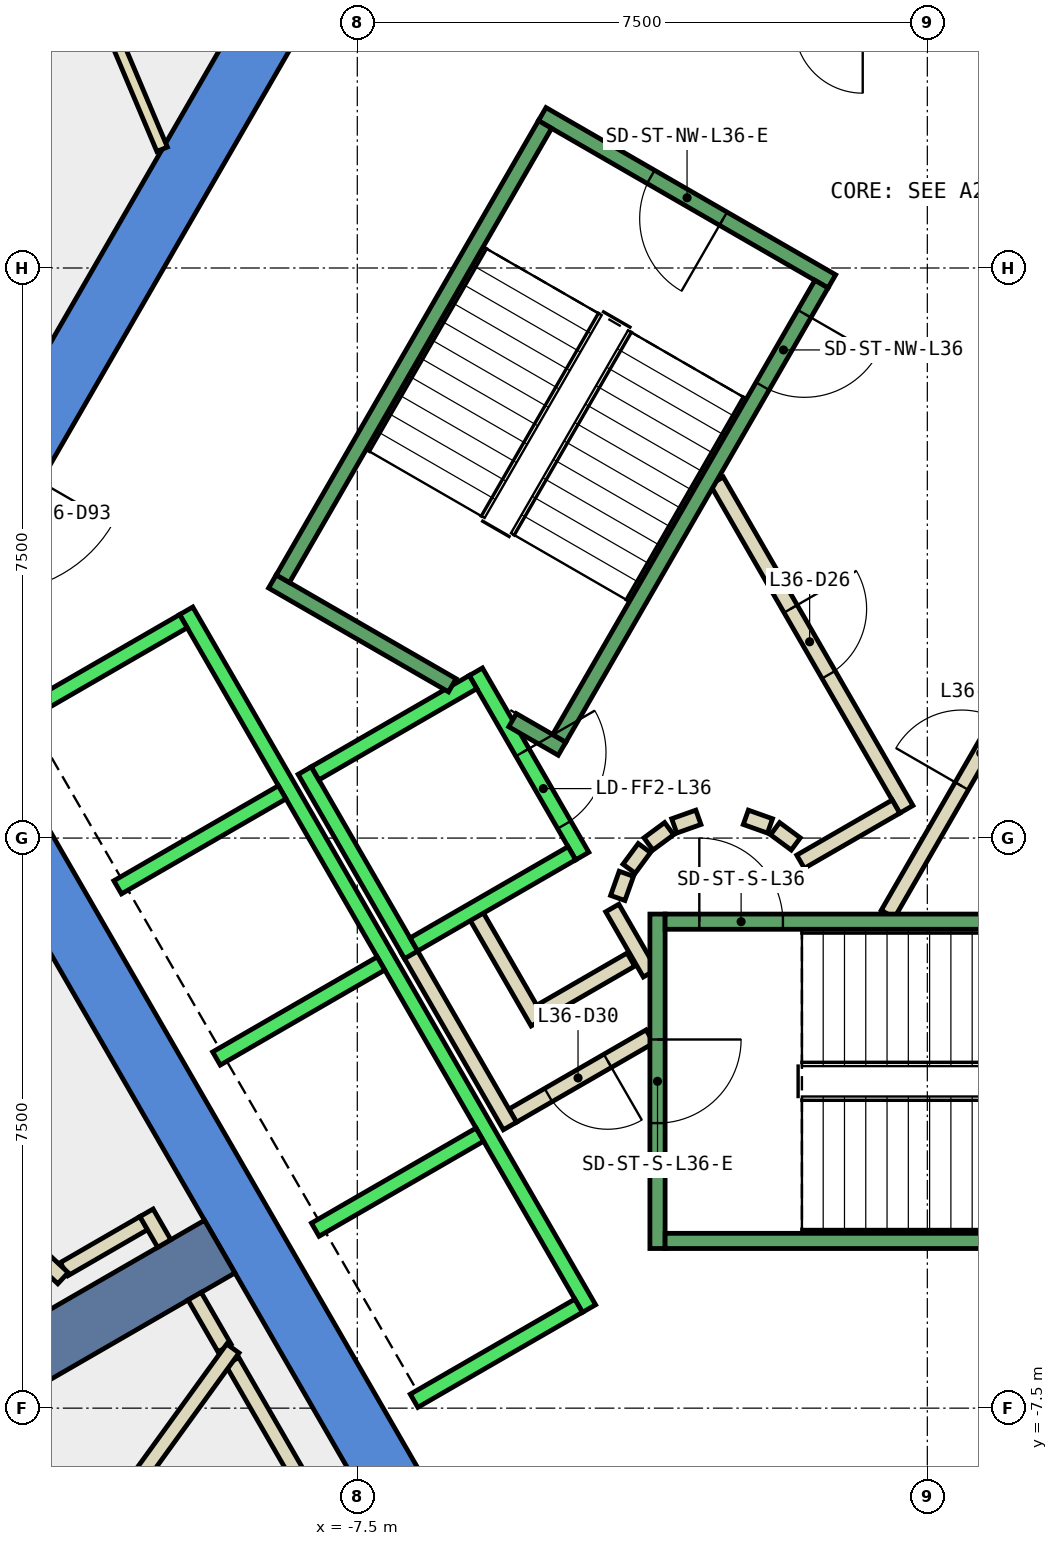
"""IFC4 building model, lengths in metres.
Left out: names, types, materials, properties, quantities, classifications, styles, units other than length and angle.
Written with IfcOpenShell. Run it as: python <this file> out.ifc"""

import sys

from ifc_helpers import new_model, si_unit, direction, frame, frame_2d, origin, place, context, subcontext, project, spatial, polyline, rectangle, outline, extrude, element, fill, save


model = new_model("IFC4")
c1 = context("Model", 3, precision=1e-05, world=origin(), true_north=direction((0.0, 1.0)))
c2 = subcontext(c1, "Body", "Model", "MODEL_VIEW")
j1 = project(units=[si_unit("LENGTHUNIT", "METRE"), si_unit("PLANEANGLEUNIT", "RADIAN")], contexts=[c1])
p1 = place(None, origin())
s1 = spatial("IfcSite", under=j1, at=p1, CompositionType="ELEMENT")
p2 = place(p1, origin())
s2 = spatial("IfcBuilding", under=s1, at=p2, CompositionType="ELEMENT")
p3 = place(p2, frame((0.0, 0.0, 163.4)))
s3 = spatial("IfcBuildingStorey", under=s2, at=p3, CompositionType="ELEMENT", Elevation=163.4)
p4 = place(p3, frame((0.0, 0.0, -0.4)))
e1 = element("IfcWall", 1, at=p4, inside=s3, PredefinedType="SHEAR", context=c2, shape_type="SweptSolid", body=[
    extrude(outline(polyline([(-12.267, 5.252), (-11.575, 4.852), (-6.466, 13.7), (-6.928, 14.5), (-12.267, 5.252)])), origin(), (0.0, 0.0, 1.0), 4.2),
])
p5 = place(p3, frame((0.0, 0.0, -0.4)))
e2 = element("IfcWall", 2, at=p5, inside=s3, PredefinedType="SHEAR", context=c2, shape_type="SweptSolid", body=[
    extrude(outline(polyline([(-13.856, 2.5), (-6.928, -9.5), (-6.466, -8.7), (-12.933, 2.5), (-13.856, 2.5)])), origin(), (0.0, 0.0, 1.0), 4.2),
])
p6 = place(p3, frame((-9.31, -5.375, -0.4), z_axis=(0.0, 0.0, 1.0), x_axis=(-0.866017533419, -0.500013631625, 0.0)))
e3 = element("IfcWall", 3, at=p6, inside=s3, PredefinedType="SHEAR", context=c2, shape_type="SweptSolid", body=[
    extrude(rectangle(XDim=9.0, YDim=0.8, at=frame_2d((4.5, 0.0))), origin(), (0.0, 0.0, 1.0), 4.2),
])
p7 = place(p3, frame((-3.9, -1.599, 0.0), z_axis=(0.0, 0.0, 1.0), x_axis=(-0.865969445389, -0.500096910261, 0.0)))
e4 = element("IfcWall", 4, at=p7, inside=s3, PredefinedType="PARTITIONING", context=c2, shape_type="SweptSolid", body=[
    extrude(rectangle(XDim=1.373, YDim=0.2, at=frame_2d((0.687, 0.0))), origin(), (0.0, 0.0, 1.0), 3.8),
])
p8 = place(p3, frame((-5.126, -2.422, 0.0), z_axis=(0.0, 0.0, 1.0), x_axis=(-0.500062241894, 0.865989465428, 0.0)))
e5 = element("IfcWall", 5, at=p8, inside=s3, PredefinedType="PARTITIONING", context=c2, shape_type="SweptSolid", body=[
    extrude(rectangle(XDim=1.7, YDim=0.2, at=frame_2d((0.85, 0.0))), origin(), (0.0, 0.0, 1.0), 3.8),
])
p9 = place(p3, frame((-3.65, -2.61, 0.0), z_axis=(0.0, 0.0, 1.0), x_axis=(-0.866072462134, -0.499918483688, 0.0)))
e6 = element("IfcWall", 6, at=p9, inside=s3, PredefinedType="PARTITIONING", context=c2, shape_type="SweptSolid", body=[
    extrude(rectangle(XDim=2.084, YDim=0.2, at=frame_2d((1.042, 0.0))), origin(), (0.0, 0.0, 1.0), 3.8),
])
p10 = place(p9, frame((0.642, 0.0, 0.0)))
e7 = element("IfcOpeningElement", 7, at=p10, cuts=e6, PredefinedType="OPENING", context=c2, shape_type="SweptSolid", body=[
    extrude(rectangle(XDim=0.9, YDim=2.1, at=frame_2d((0.45, 1.05))), frame((0.0, 0.11, 0.0), z_axis=(0.0, -1.0, 0.0), x_axis=(1.0, 0.0, 0.0)), (0.0, 0.0, 1.0), 0.22),
])
p11 = place(p3, frame((-5.492, -3.788, 0.0), z_axis=(0.0, 0.0, 1.0), x_axis=(-0.500008949224, 0.866020236886, 0.0)))
e8 = element("IfcWall", 8, at=p11, inside=s3, PredefinedType="PARTITIONING", context=c2, shape_type="SweptSolid", body=[
    extrude(rectangle(XDim=2.68, YDim=0.2, at=frame_2d((1.34, 0.0))), origin(), (0.0, 0.0, 1.0), 3.8),
])
p12 = place(p3, frame((-4.145, -0.92, 0.0), z_axis=(0.0, 0.0, 1.0), x_axis=(0.499743786207, -0.866173278362, 0.0)))
e9 = element("IfcWall", 9, at=p12, inside=s3, PredefinedType="PARTITIONING", context=c2, shape_type="SweptSolid", body=[
    extrude(rectangle(XDim=0.991, YDim=0.2, at=frame_2d((0.495, 0.0))), origin(), (0.0, 0.0, 1.0), 3.8),
])
p13 = place(p3, frame((-10.068, 9.062, 0.0), z_axis=(0.0, 0.0, 1.0), x_axis=(-0.388992587102, 0.921240884448, 0.0)))
e10 = element("IfcWall", 10, at=p13, inside=s3, PredefinedType="PARTITIONING", context=c2, shape_type="SweptSolid", body=[
    extrude(rectangle(XDim=4.257, YDim=0.15, at=frame_2d((2.128, 0.0))), origin(), (0.0, 0.0, 1.0), 3.8),
])
p14 = place(p3, frame((-0.52, -1.0, 0.0), z_axis=(0.0, 0.0, 1.0), x_axis=(0.50011622646, 0.865958290007, 0.0)))
e11 = element("IfcWall", 11, at=p14, inside=s3, PredefinedType="PARTITIONING", context=c2, shape_type="SweptSolid", body=[
    extrude(rectangle(XDim=4.991, YDim=0.2, at=frame_2d((2.496, 0.0))), origin(), (0.0, 0.0, 1.0), 3.8),
])
p15 = place(p14, frame((1.945, 0.0, 0.0)))
e12 = element("IfcOpeningElement", 12, at=p15, cuts=e11, PredefinedType="OPENING", context=c2, shape_type="SweptSolid", body=[
    extrude(rectangle(XDim=1.0, YDim=2.1, at=frame_2d((0.5, 1.05))), frame((0.0, 0.11, 0.0), z_axis=(0.0, -1.0, 0.0), x_axis=(1.0, 0.0, 0.0)), (0.0, 0.0, 1.0), 0.22),
])
p16 = place(p3, frame((-2.771, 4.7, 0.0), z_axis=(0.0, 0.0, 1.0), x_axis=(0.499969479948, -0.866043023828, 0.0)))
e13 = element("IfcWall", 13, at=p16, inside=s3, PredefinedType="PARTITIONING", context=c2, shape_type="SweptSolid", body=[
    extrude(rectangle(XDim=4.99, YDim=0.2, at=frame_2d((2.495, 0.0))), origin(), (0.0, 0.0, 1.0), 3.8),
])
p17 = place(p16, frame((1.945, 0.0, 0.0)))
e14 = element("IfcOpeningElement", 14, at=p17, cuts=e13, PredefinedType="OPENING", context=c2, shape_type="SweptSolid", body=[
    extrude(rectangle(XDim=1.0, YDim=2.1, at=frame_2d((0.5, 1.05))), frame((0.0, 0.11, 0.0), z_axis=(0.0, -1.0, 0.0), x_axis=(1.0, 0.0, 0.0)), (0.0, 0.0, 1.0), 0.22),
])
p18 = place(p3, frame((-0.412, 0.414, 0.0), z_axis=(0.0, 0.0, 1.0), x_axis=(-0.866017369001, -0.500013916395, 0.0)))
e15 = element("IfcWall", 15, at=p18, inside=s3, PredefinedType="PARTITIONING", context=c2, shape_type="SweptSolid", body=[
    extrude(rectangle(XDim=1.45, YDim=0.2, at=frame_2d((0.725, 0.0))), origin(), (0.0, 0.0, 1.0), 3.8),
])
p19 = place(p3, frame((-1.731, -0.077, 0.0), z_axis=(0.0, 0.0, 1.0), x_axis=(-0.804311165252, 0.594208338422, 0.0)))
e16 = element("IfcWall", 16, at=p19, inside=s3, PredefinedType="PARTITIONING", context=c2, shape_type="SweptSolid", body=[
    extrude(rectangle(XDim=0.338, YDim=0.2, at=frame_2d((0.169, 0.0))), origin(), (0.0, 0.0, 1.0), 3.8),
])
p20 = place(p3, frame((-2.07, 0.16, 0.0), z_axis=(0.0, 0.0, 1.0), x_axis=(-0.942199461132, 0.335052496547, 0.0)))
e17 = element("IfcWall", 17, at=p20, inside=s3, PredefinedType="PARTITIONING", context=c2, shape_type="SweptSolid", body=[
    extrude(rectangle(XDim=0.337, YDim=0.2, at=frame_2d((0.169, 0.0))), origin(), (0.0, 0.0, 1.0), 3.8),
])
p21 = place(p3, frame((-3.012, 0.273, 0.0), z_axis=(0.0, 0.0, 1.0), x_axis=(-0.942280615813, -0.334824194261, 0.0)))
e18 = element("IfcWall", 18, at=p21, inside=s3, PredefinedType="PARTITIONING", context=c2, shape_type="SweptSolid", body=[
    extrude(rectangle(XDim=0.338, YDim=0.2, at=frame_2d((0.169, 0.0))), origin(), (0.0, 0.0, 1.0), 3.8),
])
p22 = place(p3, frame((-3.397, 0.124, 0.0), z_axis=(0.0, 0.0, 1.0), x_axis=(-0.804311165252, -0.594208338422, 0.0)))
e19 = element("IfcWall", 19, at=p22, inside=s3, PredefinedType="PARTITIONING", context=c2, shape_type="SweptSolid", body=[
    extrude(rectangle(XDim=0.338, YDim=0.2, at=frame_2d((0.169, 0.0))), origin(), (0.0, 0.0, 1.0), 3.8),
])
p23 = place(p3, frame((-3.723, -0.131, 0.0), z_axis=(0.0, 0.0, 1.0), x_axis=(-0.594675113454, -0.803966112121, 0.0)))
e20 = element("IfcWall", 20, at=p23, inside=s3, PredefinedType="PARTITIONING", context=c2, shape_type="SweptSolid", body=[
    extrude(rectangle(XDim=0.338, YDim=0.2, at=frame_2d((0.169, 0.0))), origin(), (0.0, 0.0, 1.0), 3.8),
])
p24 = place(p3, frame((-3.96, -0.47, 0.0), z_axis=(0.0, 0.0, 1.0), x_axis=(-0.334824194261, -0.942280615813, 0.0)))
e21 = element("IfcWall", 21, at=p24, inside=s3, PredefinedType="PARTITIONING", context=c2, shape_type="SweptSolid", body=[
    extrude(rectangle(XDim=0.338, YDim=0.2, at=frame_2d((0.169, 0.0))), origin(), (0.0, 0.0, 1.0), 3.8),
])
p25 = place(p3, frame((-7.862, -9.107, 0.0), z_axis=(0.0, 0.0, 1.0), x_axis=(-0.499994038704, 0.866028845513, 0.0)))
e22 = element("IfcWall", 22, at=p25, inside=s3, PredefinedType="PARTITIONING", context=c2, shape_type="SweptSolid", body=[
    extrude(rectangle(XDim=2.568, YDim=0.2, at=frame_2d((1.284, 0.0))), origin(), (0.0, 0.0, 1.0), 3.8),
])
p26 = place(p3, frame((-9.246, -6.71, 0.0), z_axis=(0.0, 0.0, 1.0), x_axis=(-0.499570510076, 0.86627322795, 0.0)))
e23 = element("IfcWall", 23, at=p26, inside=s3, PredefinedType="PARTITIONING", context=c2, shape_type="SweptSolid", body=[
    extrude(rectangle(XDim=0.788, YDim=0.2, at=frame_2d((0.394, 0.0))), origin(), (0.0, 0.0, 1.0), 3.8),
])
p27 = place(p3, frame((-10.31, -5.066, 0.0), z_axis=(0.0, 0.0, 1.0), x_axis=(-0.865587329375, -0.500758000661, 0.0)))
e24 = element("IfcWall", 24, at=p27, inside=s3, PredefinedType="PARTITIONING", context=c2, shape_type="SweptSolid", body=[
    extrude(rectangle(XDim=1.21, YDim=0.2, at=frame_2d((0.605, 0.0))), origin(), (0.0, 0.0, 1.0), 3.8),
])
p28 = place(p3, frame((-11.372, -5.79, 0.0), z_axis=(0.0, 0.0, 1.0), x_axis=(-0.730922728623, 0.682460229451, 0.0)))
e25 = element("IfcWall", 25, at=p28, inside=s3, PredefinedType="PARTITIONING", context=c2, shape_type="SweptSolid", body=[
    extrude(rectangle(XDim=9.924, YDim=0.2, at=frame_2d((4.962, 0.0))), origin(), (0.0, 0.0, 1.0), 3.8),
])
p29 = place(p3, frame((-13.744, -13.076, 0.0), z_axis=(0.0, 0.0, 1.0), x_axis=(0.586577314901, 0.809893235953, 0.0)))
e26 = element("IfcWall", 26, at=p29, inside=s3, PredefinedType="PARTITIONING", context=c2, shape_type="SweptSolid", body=[
    extrude(rectangle(XDim=7.854, YDim=0.2, at=frame_2d((3.927, 0.0))), origin(), (0.0, 0.0, 1.0), 3.8),
])
p30 = place(p3, frame((-10.04, -5.334, 0.0), z_axis=(0.0, 0.0, 1.0), x_axis=(-0.499405191234, 0.86636854454, 0.0)))
e27 = element("IfcWall", 27, at=p30, inside=s3, PredefinedType="PARTITIONING", context=c2, shape_type="SweptSolid", body=[
    extrude(rectangle(XDim=0.466, YDim=0.2, at=frame_2d((0.233, 0.0))), origin(), (0.0, 0.0, 1.0), 3.8),
])
p31 = place(p3, frame((-5.94, 2.188, 0.0), z_axis=(0.0, 0.0, 1.0), x_axis=(0.49994636267, -0.866056369097, 0.0)))
e28 = element("IfcWall", 28, at=p31, inside=s3, PredefinedType="STANDARD", context=c2, shape_type="SweptSolid", body=[
    extrude(rectangle(XDim=2.8, YDim=0.2, at=frame_2d((1.4, 0.0))), origin(), (0.0, 0.0, 1.0), 3.8),
])
p32 = place(p31, frame((1.225, 0.0, 0.0)))
e29 = element("IfcOpeningElement", 29, at=p32, cuts=e28, PredefinedType="OPENING", context=c2, shape_type="SweptSolid", body=[
    extrude(rectangle(XDim=1.1, YDim=2.1, at=frame_2d((0.55, 1.05))), frame((0.0, 0.11, 0.0), z_axis=(0.0, -1.0, 0.0), x_axis=(1.0, 0.0, 0.0)), (0.0, 0.0, 1.0), 0.22),
])
p33 = place(p3, frame((-8.192, 0.888, 0.0), z_axis=(0.0, 0.0, 1.0), x_axis=(0.49994636267, -0.866056369097, 0.0)))
e30 = element("IfcWall", 30, at=p33, inside=s3, PredefinedType="STANDARD", context=c2, shape_type="SweptSolid", body=[
    extrude(rectangle(XDim=2.8, YDim=0.2, at=frame_2d((1.4, 0.0))), origin(), (0.0, 0.0, 1.0), 3.8),
])
for number, where, z_axis, x_axis in (
    (31, (-5.977, 2.052, 0.0), (0.0, 0.0, 1.0), (-0.866, -0.5, 0.0)),
    (32, (-4.677, -0.2, 0.0), (0.0, 0.0, 1.0), (-0.866, -0.5, 0.0)),
):
    element("IfcWall", number, at=place(p3, frame(where, z_axis=z_axis, x_axis=x_axis)), inside=s3, PredefinedType="STANDARD", context=c2, shape_type="SweptSolid", body=[
        extrude(rectangle(XDim=2.399, YDim=0.2, at=frame_2d((1.2, 0.0))), origin(), (0.0, 0.0, 1.0), 3.8),
    ])
p34 = place(p3, frame((-9.751, 2.99, 0.0), z_axis=(0.0, 0.0, 1.0), x_axis=(0.50000090737, -0.866024879913, 0.0)))
e33 = element("IfcWall", 33, at=p34, inside=s3, PredefinedType="STANDARD", context=c2, shape_type="SweptSolid", body=[
    extrude(rectangle(XDim=10.6, YDim=0.2, at=frame_2d((5.3, 0.0))), origin(), (0.0, 0.0, 1.0), 3.8),
])
p35 = place(p3, frame((-9.788, 2.853, 0.0), z_axis=(0.0, 0.0, 1.0), x_axis=(-0.865998541277, -0.500046524342, 0.0)))
e34 = element("IfcWall", 34, at=p35, inside=s3, PredefinedType="STANDARD", context=c2, shape_type="SweptSolid", body=[
    extrude(rectangle(XDim=2.5, YDim=0.2, at=frame_2d((1.25, 0.0))), origin(), (0.0, 0.0, 1.0), 3.8),
])
for number, where, z_axis, x_axis in (
    (35, (-8.488, 0.602, 0.0), (0.0, 0.0, 1.0), (-0.866, -0.5, 0.0)),
    (36, (-7.188, -1.65, 0.0), (0.0, 0.0, 1.0), (-0.866, -0.5, 0.0)),
    (37, (-5.888, -3.902, 0.0), (0.0, 0.0, 1.0), (-0.866, -0.5, 0.0)),
    (38, (-4.588, -6.153, 0.0), (0.0, 0.0, 1.0), (-0.866, -0.5, 0.0)),
):
    element("IfcWall", number, at=place(p3, frame(where, z_axis=z_axis, x_axis=x_axis)), inside=s3, PredefinedType="STANDARD", context=c2, shape_type="SweptSolid", body=[
        extrude(rectangle(XDim=2.5, YDim=0.2, at=frame_2d((1.25, 0.0))), origin(), (0.0, 0.0, 1.0), 3.8),
    ])
p36 = place(p3, frame((-3.55, -1.0, 0.0), z_axis=(0.0, 0.0, 1.0), x_axis=(0.0, -1.0, 0.0)))
e39 = element("IfcWall", 39, at=p36, inside=s3, PredefinedType="STANDARD", context=c2, shape_type="SweptSolid", body=[
    extrude(rectangle(XDim=4.4, YDim=0.2, at=frame_2d((2.2, 0.0))), origin(), (0.0, 0.0, 1.0), 3.8),
])
p37 = place(p36, frame((1.65, 0.0, 0.0)))
e40 = element("IfcOpeningElement", 40, at=p37, cuts=e39, PredefinedType="OPENING", context=c2, shape_type="SweptSolid", body=[
    extrude(rectangle(XDim=1.1, YDim=2.2, at=frame_2d((0.55, 1.1))), frame((0.0, 0.11, 0.0), z_axis=(0.0, -1.0, 0.0), x_axis=(1.0, 0.0, 0.0)), (0.0, 0.0, 1.0), 0.22),
])
p38 = place(p3, frame((-3.45, -1.1, 0.0), z_axis=(0.0, 0.0, 1.0), x_axis=(1.0, 0.0, 0.0)))
e41 = element("IfcWall", 41, at=p38, inside=s3, PredefinedType="STANDARD", context=c2, shape_type="SweptSolid", body=[
    extrude(rectangle(XDim=6.9, YDim=0.2, at=frame_2d((3.45, 0.0))), origin(), (0.0, 0.0, 1.0), 3.8),
])
p39 = place(p38, frame((0.45, 0.0, 0.0)))
e42 = element("IfcOpeningElement", 42, at=p39, cuts=e41, PredefinedType="OPENING", context=c2, shape_type="SweptSolid", body=[
    extrude(rectangle(XDim=1.1, YDim=2.2, at=frame_2d((0.55, 1.1))), frame((0.0, 0.11, 0.0), z_axis=(0.0, -1.0, 0.0), x_axis=(1.0, 0.0, 0.0)), (0.0, 0.0, 1.0), 0.22),
])
p40 = place(p3, frame((-3.45, -5.3, 0.0), z_axis=(0.0, 0.0, 1.0), x_axis=(1.0, 0.0, 0.0)))
e43 = element("IfcWall", 43, at=p40, inside=s3, PredefinedType="STANDARD", context=c2, shape_type="SweptSolid", body=[
    extrude(rectangle(XDim=6.9, YDim=0.2, at=frame_2d((3.45, 0.0))), origin(), (0.0, 0.0, 1.0), 3.8),
])
p41 = place(p3, frame((-1.256, 7.324, 0.0), z_axis=(0.0, 0.0, 1.0), x_axis=(-0.866046073146, 0.499964197906, 0.0)))
e44 = element("IfcWall", 44, at=p41, inside=s3, PredefinedType="STANDARD", context=c2, shape_type="SweptSolid", body=[
    extrude(rectangle(XDim=4.4, YDim=0.2, at=frame_2d((2.2, 0.0))), origin(), (0.0, 0.0, 1.0), 3.8),
])
p42 = place(p41, frame((1.65, 0.0, 0.0)))
e45 = element("IfcOpeningElement", 45, at=p42, cuts=e44, PredefinedType="OPENING", context=c2, shape_type="SweptSolid", body=[
    extrude(rectangle(XDim=1.1, YDim=2.2, at=frame_2d((0.55, 1.1))), frame((0.0, 0.11, 0.0), z_axis=(0.0, -1.0, 0.0), x_axis=(1.0, 0.0, 0.0)), (0.0, 0.0, 1.0), 0.22),
])
p43 = place(p3, frame((-6.25, 2.01, 0.0), z_axis=(0.0, 0.0, 1.0), x_axis=(-0.86611865017, 0.499838457731, 0.0)))
e46 = element("IfcWall", 46, at=p43, inside=s3, PredefinedType="STANDARD", context=c2, shape_type="SweptSolid", body=[
    extrude(rectangle(XDim=2.733, YDim=0.2, at=frame_2d((1.366, 0.0))), origin(), (0.0, 0.0, 1.0), 3.8),
])
p44 = place(p3, frame((-4.806, 1.176, 0.0), z_axis=(0.0, 0.0, 1.0), x_axis=(-0.866558586415, 0.499075361355, 0.0)))
e47 = element("IfcWall", 47, at=p44, inside=s3, PredefinedType="STANDARD", context=c2, shape_type="SweptSolid", body=[
    extrude(rectangle(XDim=0.751, YDim=0.2, at=frame_2d((0.376, 0.0))), origin(), (0.0, 0.0, 1.0), 3.8),
])
p45 = place(p3, frame((-1.393, 7.288, 0.0), z_axis=(0.0, 0.0, 1.0), x_axis=(-0.499963383562, -0.866046543262, 0.0)))
e48 = element("IfcWall", 48, at=p45, inside=s3, PredefinedType="STANDARD", context=c2, shape_type="SweptSolid", body=[
    extrude(rectangle(XDim=6.9, YDim=0.2, at=frame_2d((3.45, 0.0))), origin(), (0.0, 0.0, 1.0), 3.8),
])
p46 = place(p45, frame((0.45, 0.0, 0.0)))
e49 = element("IfcOpeningElement", 49, at=p46, cuts=e48, PredefinedType="OPENING", context=c2, shape_type="SweptSolid", body=[
    extrude(rectangle(XDim=1.1, YDim=2.2, at=frame_2d((0.55, 1.1))), frame((0.0, 0.11, 0.0), z_axis=(0.0, -1.0, 0.0), x_axis=(1.0, 0.0, 0.0)), (0.0, 0.0, 1.0), 0.22),
])
p47 = place(p3, frame((-5.03, 9.388, 0.0), z_axis=(0.0, 0.0, 1.0), x_axis=(-0.499978703459, -0.866037698999, 0.0)))
e50 = element("IfcWall", 50, at=p47, inside=s3, PredefinedType="STANDARD", context=c2, shape_type="SweptSolid", body=[
    extrude(rectangle(XDim=6.9, YDim=0.2, at=frame_2d((3.45, 0.0))), origin(), (0.0, 0.0, 1.0), 3.8),
])
p48 = place(p15, origin())
e51 = element("IfcDoor", 51, at=p48, inside=s3, OperationType="SINGLE_SWING_LEFT", PredefinedType="DOOR", context=c2, shape_type="SweptSolid", body=[
    extrude(rectangle(XDim=1.0, YDim=2.1, at=frame_2d((0.5, 1.05))), frame((0.0, 0.025, 0.0), z_axis=(0.0, -1.0, 0.0), x_axis=(1.0, 0.0, 0.0)), (0.0, 0.0, 1.0), 0.05),
])
fill(e12, e51)
p49 = place(p17, origin())
e52 = element("IfcDoor", 52, at=p49, inside=s3, OperationType="SINGLE_SWING_RIGHT", PredefinedType="DOOR", context=c2, shape_type="SweptSolid", body=[
    extrude(rectangle(XDim=1.0, YDim=2.1, at=frame_2d((0.5, 1.05))), frame((0.0, 0.025, 0.0), z_axis=(0.0, -1.0, 0.0), x_axis=(1.0, 0.0, 0.0)), (0.0, 0.0, 1.0), 0.05),
])
fill(e14, e52)
p50 = place(p10, origin())
e53 = element("IfcDoor", 53, at=p50, inside=s3, OperationType="SINGLE_SWING_LEFT", PredefinedType="DOOR", context=c2, shape_type="SweptSolid", body=[
    extrude(rectangle(XDim=0.9, YDim=2.1, at=frame_2d((0.45, 1.05))), frame((0.0, 0.025, 0.0), z_axis=(0.0, -1.0, 0.0), x_axis=(1.0, 0.0, 0.0)), (0.0, 0.0, 1.0), 0.05),
])
fill(e7, e53)
p51 = place(p32, origin())
e54 = element("IfcDoor", 54, at=p51, inside=s3, OperationType="SLIDING_TO_LEFT", PredefinedType="DOOR", context=c2, shape_type="SweptSolid", body=[
    extrude(rectangle(XDim=1.1, YDim=2.1, at=frame_2d((0.55, 1.05))), frame((0.0, 0.025, 0.0), z_axis=(0.0, -1.0, 0.0), x_axis=(1.0, 0.0, 0.0)), (0.0, 0.0, 1.0), 0.05),
])
fill(e29, e54)
p52 = place(p39, origin())
e55 = element("IfcDoor", 55, at=p52, inside=s3, OperationType="SINGLE_SWING_LEFT", PredefinedType="DOOR", context=c2, shape_type="SweptSolid", body=[
    extrude(rectangle(XDim=1.1, YDim=2.2, at=frame_2d((0.55, 1.1))), frame((0.0, 0.025, 0.0), z_axis=(0.0, -1.0, 0.0), x_axis=(1.0, 0.0, 0.0)), (0.0, 0.0, 1.0), 0.05),
])
fill(e42, e55)
p53 = place(p37, origin())
e56 = element("IfcDoor", 56, at=p53, inside=s3, OperationType="SINGLE_SWING_LEFT", PredefinedType="DOOR", context=c2, shape_type="SweptSolid", body=[
    extrude(rectangle(XDim=1.1, YDim=2.2, at=frame_2d((0.55, 1.1))), frame((0.0, 0.025, 0.0), z_axis=(0.0, -1.0, 0.0), x_axis=(1.0, 0.0, 0.0)), (0.0, 0.0, 1.0), 0.05),
])
fill(e40, e56)
p54 = place(p46, origin())
e57 = element("IfcDoor", 57, at=p54, inside=s3, OperationType="SINGLE_SWING_LEFT", PredefinedType="DOOR", context=c2, shape_type="SweptSolid", body=[
    extrude(rectangle(XDim=1.1, YDim=2.2, at=frame_2d((0.55, 1.1))), frame((0.0, 0.025, 0.0), z_axis=(0.0, -1.0, 0.0), x_axis=(1.0, 0.0, 0.0)), (0.0, 0.0, 1.0), 0.05),
])
fill(e49, e57)
p55 = place(p42, origin())
e58 = element("IfcDoor", 58, at=p55, inside=s3, OperationType="SINGLE_SWING_LEFT", PredefinedType="DOOR", context=c2, shape_type="SweptSolid", body=[
    extrude(rectangle(XDim=1.1, YDim=2.2, at=frame_2d((0.55, 1.1))), frame((0.0, 0.025, 0.0), z_axis=(0.0, -1.0, 0.0), x_axis=(1.0, 0.0, 0.0)), (0.0, 0.0, 1.0), 0.05),
])
fill(e45, e58)
save(model, sys.argv[1])
